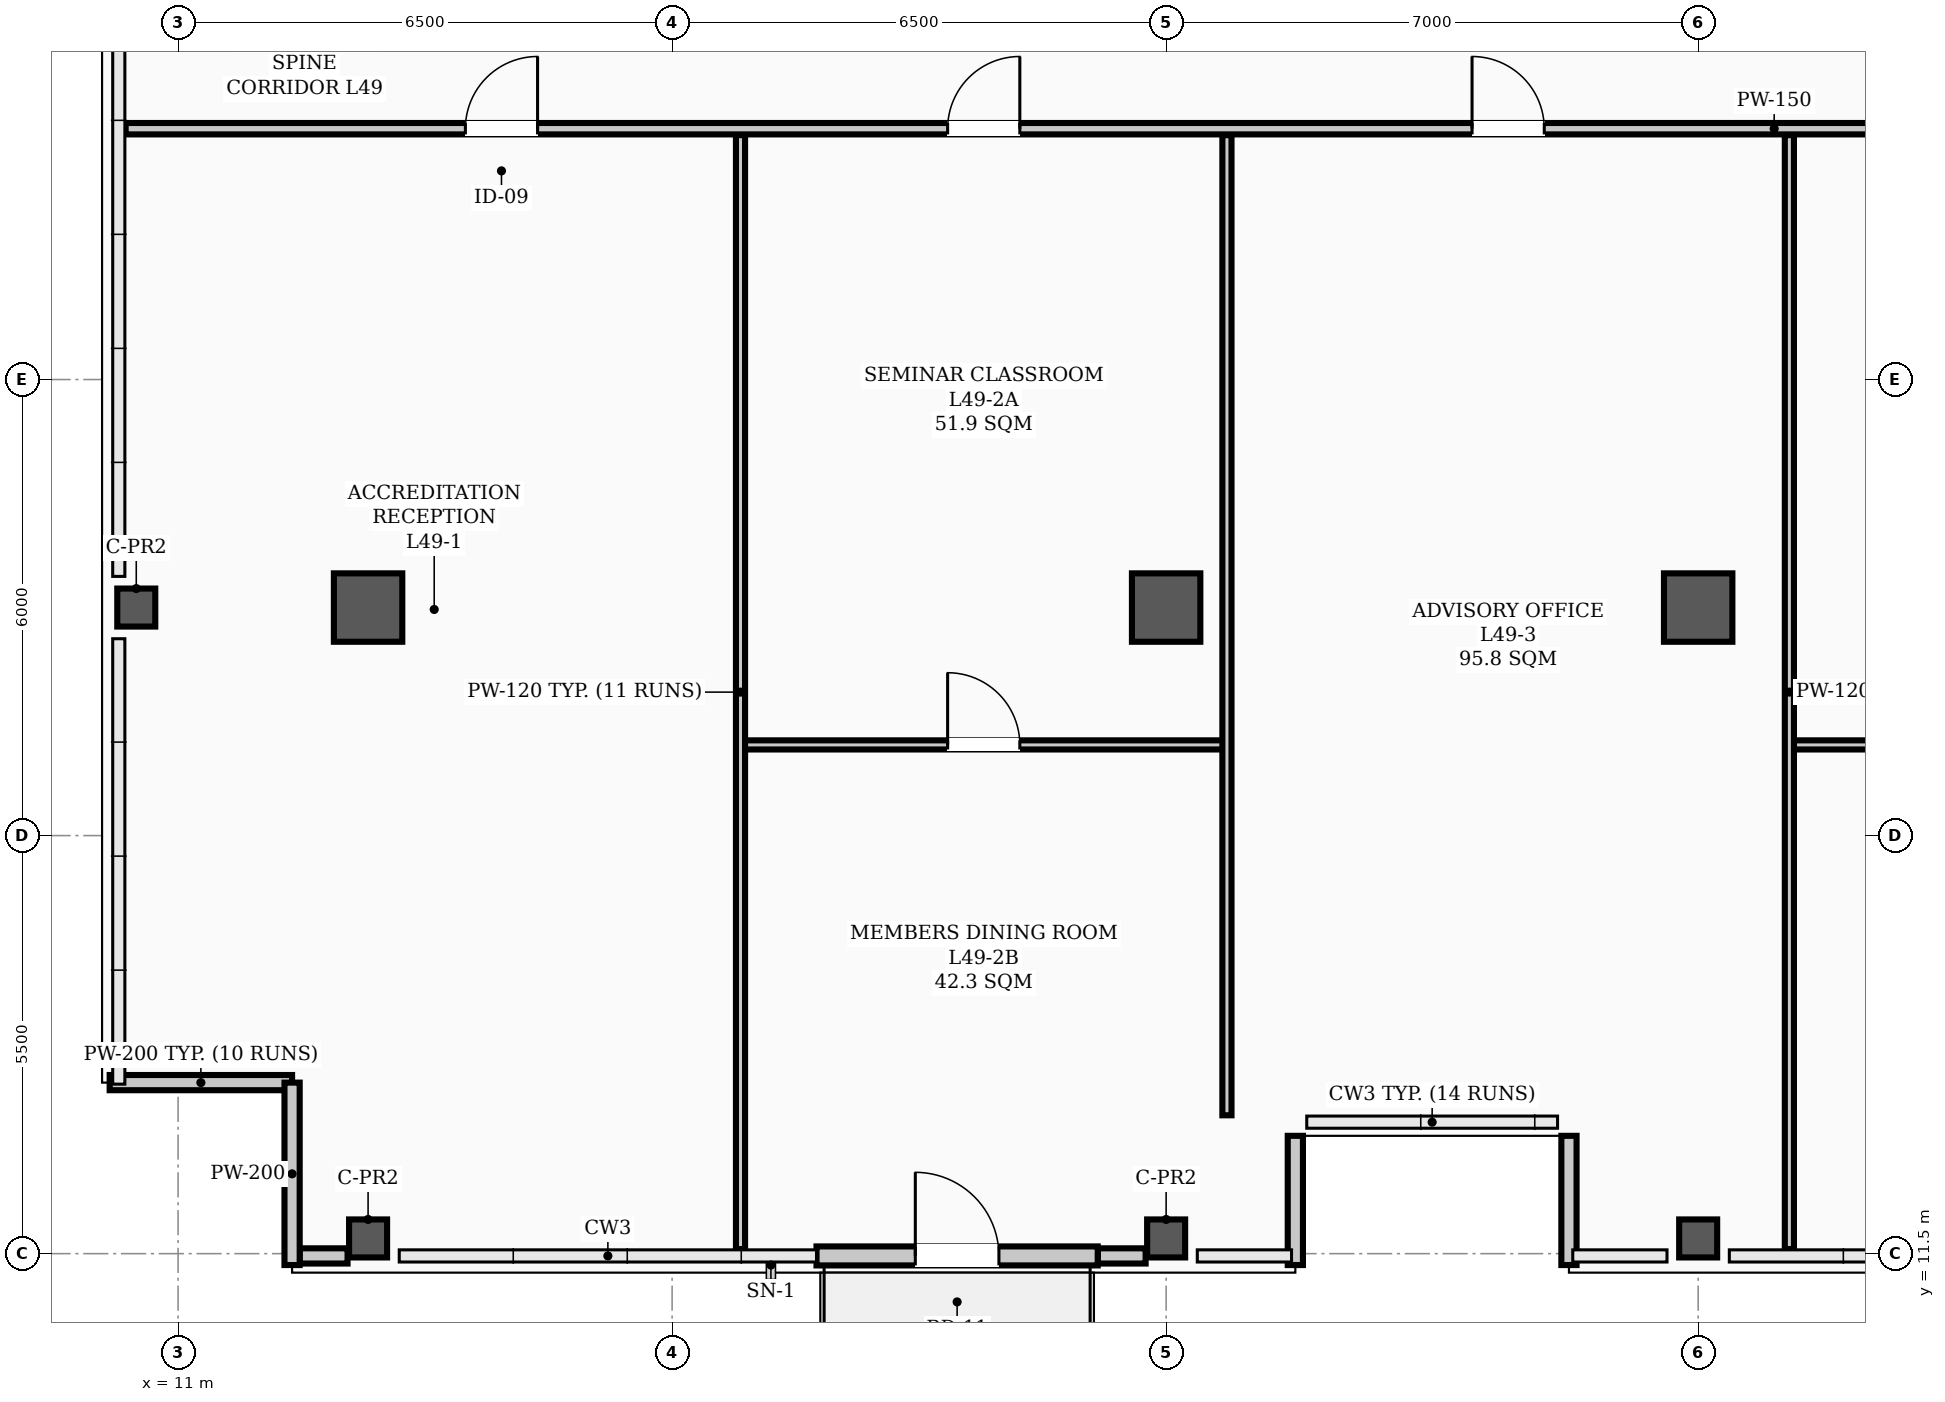
"""IFC4 building model, lengths in metres.
Left out: names, types, materials, properties, quantities, classifications, styles, units other than length and angle.
Written with IfcOpenShell. Run it as: python <this file> out.ifc"""

import sys

from ifc_helpers import new_model, si_unit, direction, frame, frame_2d, origin, origin_2d, place, context, subcontext, project, spatial, rectangle, hollow_rectangle, extrude, element, fill, save


model = new_model("IFC4")
c1 = context("Model", 3, precision=1e-05, world=origin(), true_north=direction((0.0, 1.0)))
c2 = subcontext(c1, "Body", "Model", "MODEL_VIEW")
j1 = project(units=[si_unit("LENGTHUNIT", "METRE"), si_unit("PLANEANGLEUNIT", "RADIAN")], contexts=[c1])
p1 = place(None, origin())
s1 = spatial("IfcSite", under=j1, at=p1, CompositionType="ELEMENT")
p2 = place(p1, origin())
s2 = spatial("IfcBuilding", under=s1, at=p2, CompositionType="ELEMENT")
p3 = place(p2, frame((0.0, 0.0, 196.8)))
s3 = spatial("IfcBuildingStorey", under=s2, at=p3, CompositionType="ELEMENT", Elevation=196.8)
for number, where, z_axis, x_axis in (
    (1, (13.5, 20.0, 0.0), (0.0, 0.0, 1.0), (1.0, 0.0, 0.0)),
    (2, (24.0, 20.0, 0.0), (0.0, 0.0, 1.0), (1.0, 0.0, 0.0)),
    (3, (31.0, 20.0, 0.0), (0.0, 0.0, 1.0), (1.0, 0.0, 0.0)),
):
    element("IfcColumn", number, at=place(p3, frame(where, z_axis=z_axis, x_axis=x_axis)), inside=s3, PredefinedType="COLUMN", context=c2, shape_type="SweptSolid", body=[
        extrude(hollow_rectangle(XDim=0.9, YDim=0.9, WallThickness=0.035, InnerFilletRadius=0.017, OuterFilletRadius=0.052, at=origin_2d()), origin(), (0.0, 0.0, 1.0), 3.9),
    ])
for number, where, z_axis, x_axis in (
    (4, (10.45, 20.0, 0.0), (0.0, 0.0, 1.0), (1.0, 0.0, 0.0)),
    (5, (13.5, 11.7, 0.0), (0.0, 0.0, 1.0), (1.0, 0.0, 0.0)),
    (6, (24.0, 11.7, 0.0), (0.0, 0.0, 1.0), (1.0, 0.0, 0.0)),
    (7, (31.0, 11.7, 0.0), (0.0, 0.0, 1.0), (1.0, 0.0, 0.0)),
):
    element("IfcColumn", number, at=place(p3, frame(where, z_axis=z_axis, x_axis=x_axis)), inside=s3, PredefinedType="COLUMN", context=c2, shape_type="SweptSolid", body=[
        extrude(hollow_rectangle(XDim=0.5, YDim=0.5, WallThickness=0.024, InnerFilletRadius=0.012, OuterFilletRadius=0.036, at=origin_2d()), origin(), (0.0, 0.0, 1.0), 3.9),
    ])
for number, where, z_axis, x_axis in (
    (8, (12.6, 11.47, 0.0), (0.0, 0.0, 1.0), (1.0, 0.0, 0.0)),
    (9, (23.1, 11.47, 0.0), (0.0, 0.0, 1.0), (1.0, 0.0, 0.0)),
):
    element("IfcWall", number, at=place(p3, frame(where, z_axis=z_axis, x_axis=x_axis)), inside=s3, PredefinedType="PARAPET", context=c2, shape_type="SweptSolid", body=[
        extrude(rectangle(XDim=0.63, YDim=0.2, at=frame_2d((0.315, 0.0))), origin(), (0.0, 0.0, 1.0), 1.2),
    ])
for number, where, z_axis, x_axis in (
    (10, (10.1, 13.75, 0.0), (0.0, 0.0, 1.0), (1.0, 0.0, 0.0)),
    (11, (12.5, 13.75, 0.0), (0.0, 0.0, 1.0), (0.0, -1.0, 0.0)),
):
    element("IfcWall", number, at=place(p3, frame(where, z_axis=z_axis, x_axis=x_axis)), inside=s3, PredefinedType="PARAPET", context=c2, shape_type="SweptSolid", body=[
        extrude(rectangle(XDim=2.4, YDim=0.2, at=frame_2d((1.2, 0.0))), origin(), (0.0, 0.0, 1.0), 1.2),
    ])
for number, where, z_axis, x_axis in (
    (12, (25.7, 11.35, 0.0), (0.0, 0.0, 1.0), (0.0, 1.0, 0.0)),
    (13, (29.3, 13.05, 0.0), (0.0, 0.0, 1.0), (0.0, -1.0, 0.0)),
):
    element("IfcWall", number, at=place(p3, frame(where, z_axis=z_axis, x_axis=x_axis)), inside=s3, PredefinedType="PARAPET", context=c2, shape_type="SweptSolid", body=[
        extrude(rectangle(XDim=1.7, YDim=0.2, at=frame_2d((0.85, 0.0))), origin(), (0.0, 0.0, 1.0), 1.2),
    ])
p4 = place(p3, frame((19.4, 11.47, 0.0), z_axis=(0.0, 0.0, 1.0), x_axis=(1.0, 0.0, 0.0)))
e14 = element("IfcWall", 14, at=p4, inside=s3, PredefinedType="STANDARD", context=c2, shape_type="SweptSolid", body=[
    extrude(rectangle(XDim=3.7, YDim=0.25, at=frame_2d((1.85, 0.0))), origin(), (0.0, 0.0, 1.0), 2.16),
])
p5 = place(p4, frame((1.3, 0.0, 0.0)))
e15 = element("IfcOpeningElement", 15, at=p5, cuts=e14, PredefinedType="OPENING", context=c2, shape_type="SweptSolid", body=[
    extrude(rectangle(XDim=1.1, YDim=2.2, at=frame_2d((0.55, 1.1))), frame((0.0, 0.135, 0.0), z_axis=(0.0, -1.0, 0.0), x_axis=(1.0, 0.0, 0.0)), (0.0, 0.0, 1.0), 0.27),
])
p6 = place(p3, frame((10.31, 26.3, 0.0), z_axis=(0.0, 0.0, 1.0), x_axis=(1.0, 0.0, 0.0)))
e16 = element("IfcWall", 16, at=p6, inside=s3, PredefinedType="PARTITIONING", context=c2, shape_type="SweptSolid", body=[
    extrude(rectangle(XDim=43.38, YDim=0.15, at=frame_2d((21.69, 0.0))), origin(), (0.0, 0.0, 1.0), 2.18),
])
p7 = place(p6, frame((4.47, 0.0, 0.0)))
e17 = element("IfcOpeningElement", 17, at=p7, cuts=e16, PredefinedType="OPENING", context=c2, shape_type="SweptSolid", body=[
    extrude(rectangle(XDim=0.95, YDim=2.08, at=frame_2d((0.475, 1.04))), frame((0.0, 0.085, 0.0), z_axis=(0.0, -1.0, 0.0), x_axis=(1.0, 0.0, 0.0)), (0.0, 0.0, 1.0), 0.17),
])
p8 = place(p6, frame((10.815, 0.0, 0.0)))
e18 = element("IfcOpeningElement", 18, at=p8, cuts=e16, PredefinedType="OPENING", context=c2, shape_type="SweptSolid", body=[
    extrude(rectangle(XDim=0.95, YDim=2.08, at=frame_2d((0.475, 1.04))), frame((0.0, 0.085, 0.0), z_axis=(0.0, -1.0, 0.0), x_axis=(1.0, 0.0, 0.0)), (0.0, 0.0, 1.0), 0.17),
])
p9 = place(p6, frame((17.715, 0.0, 0.0)))
e19 = element("IfcOpeningElement", 19, at=p9, cuts=e16, PredefinedType="OPENING", context=c2, shape_type="SweptSolid", body=[
    extrude(rectangle(XDim=0.95, YDim=2.08, at=frame_2d((0.475, 1.04))), frame((0.0, 0.085, 0.0), z_axis=(0.0, -1.0, 0.0), x_axis=(1.0, 0.0, 0.0)), (0.0, 0.0, 1.0), 0.17),
])
p10 = place(p6, frame((24.815, 0.0, 0.0)))
e20 = element("IfcOpeningElement", 20, at=p10, cuts=e16, PredefinedType="OPENING", context=c2, shape_type="SweptSolid", body=[
    extrude(rectangle(XDim=0.95, YDim=2.08, at=frame_2d((0.475, 1.04))), frame((0.0, 0.085, 0.0), z_axis=(0.0, -1.0, 0.0), x_axis=(1.0, 0.0, 0.0)), (0.0, 0.0, 1.0), 0.17),
])
p11 = place(p6, frame((31.415, 0.0, 0.0)))
e21 = element("IfcOpeningElement", 21, at=p11, cuts=e16, PredefinedType="OPENING", context=c2, shape_type="SweptSolid", body=[
    extrude(rectangle(XDim=0.95, YDim=2.08, at=frame_2d((0.475, 1.04))), frame((0.0, 0.085, 0.0), z_axis=(0.0, -1.0, 0.0), x_axis=(1.0, 0.0, 0.0)), (0.0, 0.0, 1.0), 0.17),
])
p12 = place(p3, frame((18.4, 18.193, 0.0), z_axis=(0.0, 0.0, 1.0), x_axis=(1.0, 0.0, 0.0)))
e22 = element("IfcWall", 22, at=p12, inside=s3, PredefinedType="PARTITIONING", context=c2, shape_type="SweptSolid", body=[
    extrude(rectangle(XDim=6.4, YDim=0.12, at=frame_2d((3.2, 0.0))), origin(), (0.0, 0.0, 1.0), 2.18),
])
p13 = place(p12, frame((2.725, 0.0, 0.0)))
e23 = element("IfcOpeningElement", 23, at=p13, cuts=e22, PredefinedType="OPENING", context=c2, shape_type="SweptSolid", body=[
    extrude(rectangle(XDim=0.95, YDim=2.08, at=frame_2d((0.475, 1.04))), frame((0.0, 0.07, 0.0), z_axis=(0.0, -1.0, 0.0), x_axis=(1.0, 0.0, 0.0)), (0.0, 0.0, 1.0), 0.14),
])
p14 = place(p3, frame((32.2, 18.193, 0.0), z_axis=(0.0, 0.0, 1.0), x_axis=(1.0, 0.0, 0.0)))
e24 = element("IfcWall", 24, at=p14, inside=s3, PredefinedType="PARTITIONING", context=c2, shape_type="SweptSolid", body=[
    extrude(rectangle(XDim=6.8, YDim=0.12, at=frame_2d((3.4, 0.0))), origin(), (0.0, 0.0, 1.0), 2.18),
])
p15 = place(p14, frame((2.925, 0.0, 0.0)))
e25 = element("IfcOpeningElement", 25, at=p15, cuts=e24, PredefinedType="OPENING", context=c2, shape_type="SweptSolid", body=[
    extrude(rectangle(XDim=0.95, YDim=2.08, at=frame_2d((0.475, 1.04))), frame((0.0, 0.07, 0.0), z_axis=(0.0, -1.0, 0.0), x_axis=(1.0, 0.0, 0.0)), (0.0, 0.0, 1.0), 0.14),
])
p16 = place(p3, frame((18.4, 11.56, 0.0), z_axis=(0.0, 0.0, 1.0), x_axis=(0.0, 1.0, 0.0)))
e26 = element("IfcWall", 26, at=p16, inside=s3, PredefinedType="PARTITIONING", context=c2, shape_type="SweptSolid", body=[
    extrude(rectangle(XDim=14.655, YDim=0.12, at=frame_2d((7.328, 0.0))), origin(), (0.0, 0.0, 1.0), 2.18),
])
p17 = place(p3, frame((24.8, 13.32, 0.0), z_axis=(0.0, 0.0, 1.0), x_axis=(0.0, 1.0, 0.0)))
e27 = element("IfcWall", 27, at=p17, inside=s3, PredefinedType="PARTITIONING", context=c2, shape_type="SweptSolid", body=[
    extrude(rectangle(XDim=12.895, YDim=0.12, at=frame_2d((6.448, 0.0))), origin(), (0.0, 0.0, 1.0), 2.18),
])
p18 = place(p3, frame((32.2, 11.56, 0.0), z_axis=(0.0, 0.0, 1.0), x_axis=(0.0, 1.0, 0.0)))
e28 = element("IfcWall", 28, at=p18, inside=s3, PredefinedType="PARTITIONING", context=c2, shape_type="SweptSolid", body=[
    extrude(rectangle(XDim=14.655, YDim=0.12, at=frame_2d((7.328, 0.0))), origin(), (0.0, 0.0, 1.0), 2.18),
])
p19 = place(p5, origin())
e29 = element("IfcDoor", 29, at=p19, inside=s3, OperationType="SINGLE_SWING_LEFT", PredefinedType="DOOR", context=c2, shape_type="SweptSolid", body=[
    extrude(rectangle(XDim=1.1, YDim=2.2, at=frame_2d((0.55, 1.1))), frame((0.0, 0.025, 0.0), z_axis=(0.0, -1.0, 0.0), x_axis=(1.0, 0.0, 0.0)), (0.0, 0.0, 1.0), 0.05),
])
fill(e15, e29)
p20 = place(p7, origin())
e30 = element("IfcDoor", 30, at=p20, inside=s3, OperationType="SINGLE_SWING_RIGHT", PredefinedType="DOOR", context=c2, shape_type="SweptSolid", body=[
    extrude(rectangle(XDim=0.95, YDim=2.08, at=frame_2d((0.475, 1.04))), frame((0.0, 0.025, 0.0), z_axis=(0.0, -1.0, 0.0), x_axis=(1.0, 0.0, 0.0)), (0.0, 0.0, 1.0), 0.05),
])
fill(e17, e30)
p21 = place(p13, origin())
e31 = element("IfcDoor", 31, at=p21, inside=s3, OperationType="SINGLE_SWING_LEFT", PredefinedType="DOOR", context=c2, shape_type="SweptSolid", body=[
    extrude(rectangle(XDim=0.95, YDim=2.08, at=frame_2d((0.475, 1.04))), frame((0.0, 0.025, 0.0), z_axis=(0.0, -1.0, 0.0), x_axis=(1.0, 0.0, 0.0)), (0.0, 0.0, 1.0), 0.05),
])
fill(e23, e31)
p22 = place(p8, origin())
e32 = element("IfcDoor", 32, at=p22, inside=s3, OperationType="SINGLE_SWING_RIGHT", PredefinedType="DOOR", context=c2, shape_type="SweptSolid", body=[
    extrude(rectangle(XDim=0.95, YDim=2.08, at=frame_2d((0.475, 1.04))), frame((0.0, 0.025, 0.0), z_axis=(0.0, -1.0, 0.0), x_axis=(1.0, 0.0, 0.0)), (0.0, 0.0, 1.0), 0.05),
])
fill(e18, e32)
p23 = place(p9, origin())
e33 = element("IfcDoor", 33, at=p23, inside=s3, OperationType="SINGLE_SWING_LEFT", PredefinedType="DOOR", context=c2, shape_type="SweptSolid", body=[
    extrude(rectangle(XDim=0.95, YDim=2.08, at=frame_2d((0.475, 1.04))), frame((0.0, 0.025, 0.0), z_axis=(0.0, -1.0, 0.0), x_axis=(1.0, 0.0, 0.0)), (0.0, 0.0, 1.0), 0.05),
])
fill(e19, e33)
save(model, sys.argv[1])
